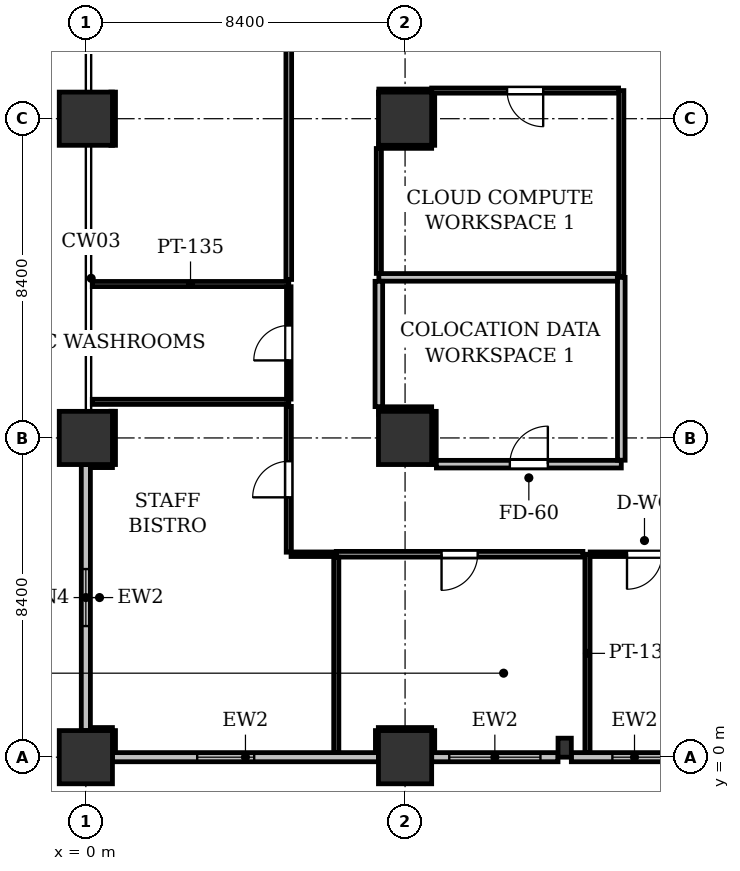
"""IFC4 building model, lengths in metres.
Left out: names, types, materials, properties, quantities, classifications, styles, units other than length and angle.
Written with IfcOpenShell. Run it as: python <this file> out.ifc"""

import sys

from ifc_helpers import new_model, si_unit, direction, frame, frame_2d, origin, origin_2d, place, context, subcontext, project, spatial, rectangle, extrude, element, fill, save


model = new_model("IFC4")
c1 = context("Model", 3, precision=1e-05, world=origin(), true_north=direction((0.0, 1.0)))
c2 = subcontext(c1, "Body", "Model", "MODEL_VIEW")
j1 = project(units=[si_unit("LENGTHUNIT", "METRE"), si_unit("PLANEANGLEUNIT", "RADIAN")], contexts=[c1])
p1 = place(None, origin())
s1 = spatial("IfcSite", under=j1, at=p1, CompositionType="ELEMENT")
p2 = place(p1, origin())
s2 = spatial("IfcBuilding", under=s1, at=p2, CompositionType="ELEMENT")
p3 = place(p2, frame((0.0, 0.0, 15.0)))
s3 = spatial("IfcBuildingStorey", under=s2, at=p3, CompositionType="ELEMENT", Elevation=15.0)
for number, where, z_axis, x_axis in (
    (1, (0.0, 0.0, 0.0), (0.0, 0.0, 1.0), (1.0, 0.0, 0.0)),
    (2, (0.0, 8.4, 0.0), (0.0, 0.0, 1.0), (1.0, 0.0, 0.0)),
    (3, (0.0, 16.8, 0.0), (0.0, 0.0, 1.0), (1.0, 0.0, 0.0)),
    (4, (8.4, 0.0, 0.0), (0.0, 0.0, 1.0), (1.0, 0.0, 0.0)),
    (5, (8.4, 8.4, 0.0), (0.0, 0.0, 1.0), (1.0, 0.0, 0.0)),
    (6, (8.4, 16.8, 0.0), (0.0, 0.0, 1.0), (1.0, 0.0, 0.0)),
):
    element("IfcColumn", number, at=place(p3, frame(where, z_axis=z_axis, x_axis=x_axis)), inside=s3, PredefinedType="COLUMN", context=c2, shape_type="SweptSolid", body=[
        extrude(rectangle(XDim=1.4, YDim=1.4, at=origin_2d()), origin(), (0.0, 0.0, 1.0), 4.8),
    ])
p4 = place(p3, frame((12.6, 0.25, 0.0), z_axis=(0.0, 0.0, 1.0), x_axis=(1.0, 0.0, 0.0)))
e7 = element("IfcColumn", 7, at=p4, inside=s3, PredefinedType="PILASTER", context=c2, shape_type="SweptSolid", body=[
    extrude(rectangle(XDim=0.35, YDim=0.5, at=origin_2d()), origin(), (0.0, 0.0, 1.0), 4.8),
])
p5 = place(p3, frame((0.0, 0.7, 0.0), z_axis=(0.0, 0.0, 1.0), x_axis=(0.0, 1.0, 0.0)))
e8 = element("IfcWall", 8, at=p5, inside=s3, PredefinedType="STANDARD", context=c2, shape_type="SweptSolid", body=[
    extrude(rectangle(XDim=7.0, YDim=0.24, at=frame_2d((3.5, 0.0))), origin(), (0.0, 0.0, 1.0), 3.25),
])
p6 = place(p5, frame((2.75, 0.0, 0.9)))
e9 = element("IfcOpeningElement", 9, at=p6, cuts=e8, PredefinedType="OPENING", context=c2, shape_type="SweptSolid", body=[
    extrude(rectangle(XDim=1.5, YDim=1.6, at=frame_2d((0.75, 0.8))), frame((0.0, 0.13, 0.0), z_axis=(0.0, -1.0, 0.0), x_axis=(1.0, 0.0, 0.0)), (0.0, 0.0, 1.0), 0.26),
])
p7 = place(p3, frame((16.1, 0.0, 0.0), z_axis=(0.0, 0.0, 1.0), x_axis=(-1.0, 0.0, 0.0)))
e10 = element("IfcWall", 10, at=p7, inside=s3, PredefinedType="STANDARD", context=c2, shape_type="SweptSolid", body=[
    extrude(rectangle(XDim=3.325, YDim=0.24, at=frame_2d((1.663, 0.0))), origin(), (0.0, 0.0, 1.0), 3.05),
])
p8 = place(p7, frame((0.745, 0.0, 0.9)))
e11 = element("IfcOpeningElement", 11, at=p8, cuts=e10, PredefinedType="OPENING", context=c2, shape_type="SweptSolid", body=[
    extrude(rectangle(XDim=1.5, YDim=1.6, at=frame_2d((0.75, 0.8))), frame((0.0, 0.13, 0.0), z_axis=(0.0, -1.0, 0.0), x_axis=(1.0, 0.0, 0.0)), (0.0, 0.0, 1.0), 0.26),
])
p9 = place(p3, frame((12.425, 0.0, 0.0), z_axis=(0.0, 0.0, 1.0), x_axis=(-1.0, 0.0, 0.0)))
e12 = element("IfcWall", 12, at=p9, inside=s3, PredefinedType="STANDARD", context=c2, shape_type="SweptSolid", body=[
    extrude(rectangle(XDim=3.325, YDim=0.24, at=frame_2d((1.663, 0.0))), origin(), (0.0, 0.0, 1.0), 3.05),
])
p10 = place(p9, frame((0.462, 0.0, 0.9)))
e13 = element("IfcOpeningElement", 13, at=p10, cuts=e12, PredefinedType="OPENING", context=c2, shape_type="SweptSolid", body=[
    extrude(rectangle(XDim=2.4, YDim=1.8, at=frame_2d((1.2, 0.9))), frame((0.0, 0.13, 0.0), z_axis=(0.0, -1.0, 0.0), x_axis=(1.0, 0.0, 0.0)), (0.0, 0.0, 1.0), 0.26),
])
p11 = place(p3, frame((7.7, 0.0, 0.0), z_axis=(0.0, 0.0, 1.0), x_axis=(-1.0, 0.0, 0.0)))
e14 = element("IfcWall", 14, at=p11, inside=s3, PredefinedType="STANDARD", context=c2, shape_type="SweptSolid", body=[
    extrude(rectangle(XDim=7.0, YDim=0.24, at=frame_2d((3.5, 0.0))), origin(), (0.0, 0.0, 1.0), 3.05),
])
p12 = place(p11, frame((3.27, 0.0, 0.9)))
e15 = element("IfcOpeningElement", 15, at=p12, cuts=e14, PredefinedType="OPENING", context=c2, shape_type="SweptSolid", body=[
    extrude(rectangle(XDim=1.5, YDim=1.6, at=frame_2d((0.75, 0.8))), frame((0.0, 0.13, 0.0), z_axis=(0.0, -1.0, 0.0), x_axis=(1.0, 0.0, 0.0)), (0.0, 0.0, 1.0), 0.26),
])
p13 = place(p3, frame((13.2, 5.34, 0.0), z_axis=(0.0, 0.0, 1.0), x_axis=(0.0, -1.0, 0.0)))
e16 = element("IfcWall", 16, at=p13, inside=s3, PredefinedType="PARTITIONING", context=c2, shape_type="SweptSolid", body=[
    extrude(rectangle(XDim=5.216, YDim=0.135, at=frame_2d((2.608, 0.0))), origin(), (0.0, 0.0, 1.0), 3.05),
])
p14 = place(p3, frame((16.128, 5.34, 0.0), z_axis=(0.0, 0.0, 1.0), x_axis=(-1.0, 0.0, 0.0)))
e17 = element("IfcWall", 17, at=p14, inside=s3, PredefinedType="PARTITIONING", context=c2, shape_type="SweptSolid", body=[
    extrude(rectangle(XDim=2.857, YDim=0.12, at=frame_2d((1.428, 0.0))), origin(), (0.0, 0.0, 1.0), 4.45),
])
p15 = place(p14, frame((0.969, 0.0, 0.0)))
e18 = element("IfcOpeningElement", 18, at=p15, cuts=e17, PredefinedType="OPENING", context=c2, shape_type="SweptSolid", body=[
    extrude(rectangle(XDim=0.92, YDim=2.1, at=frame_2d((0.46, 1.05))), frame((0.0, 0.07, 0.0), z_axis=(0.0, -1.0, 0.0), x_axis=(1.0, 0.0, 0.0)), (0.0, 0.0, 1.0), 0.14),
])
for number, where, z_axis, x_axis in (
    (19, (5.34, 12.45, 0.0), (0.0, 0.0, 1.0), (-1.0, 0.0, 0.0)),
    (20, (0.169, 9.35, 0.0), (0.0, 0.0, 1.0), (1.0, 0.0, 0.0)),
):
    element("IfcWall", number, at=place(p3, frame(where, z_axis=z_axis, x_axis=x_axis)), inside=s3, PredefinedType="PARTITIONING", context=c2, shape_type="SweptSolid", body=[
        extrude(rectangle(XDim=5.171, YDim=0.135, at=frame_2d((2.585, 0.0))), origin(), (0.0, 0.0, 1.0), 3.25),
    ])
p16 = place(p3, frame((5.34, 9.421, 0.0), z_axis=(0.0, 0.0, 1.0), x_axis=(0.0, 1.0, 0.0)))
e21 = element("IfcWall", 21, at=p16, inside=s3, PredefinedType="PARTITIONING", context=c2, shape_type="SweptSolid", body=[
    extrude(rectangle(XDim=2.957, YDim=0.12, at=frame_2d((1.479, 0.0))), origin(), (0.0, 0.0, 1.0), 4.45),
])
p17 = place(p16, frame((1.019, 0.0, 0.0)))
e22 = element("IfcOpeningElement", 22, at=p17, cuts=e21, PredefinedType="OPENING", context=c2, shape_type="SweptSolid", body=[
    extrude(rectangle(XDim=0.92, YDim=2.1, at=frame_2d((0.46, 1.05))), frame((0.0, 0.07, 0.0), z_axis=(0.0, -1.0, 0.0), x_axis=(1.0, 0.0, 0.0)), (0.0, 0.0, 1.0), 0.14),
])
p18 = place(p3, frame((7.71, 9.12, 0.0), z_axis=(0.0, 0.0, 1.0), x_axis=(1.0, 0.0, 0.0)))
e23 = element("IfcWall", 23, at=p18, inside=s3, PredefinedType="PARTITIONING", context=c2, shape_type="SweptSolid", body=[
    extrude(rectangle(XDim=1.39, YDim=0.2, at=frame_2d((0.695, 0.0))), origin(), (0.0, 0.0, 1.0), 3.25),
])
p19 = place(p3, frame((9.12, 9.1, 0.0), z_axis=(0.0, 0.0, 1.0), x_axis=(0.0, -1.0, 0.0)))
e24 = element("IfcWall", 24, at=p19, inside=s3, PredefinedType="PARTITIONING", context=c2, shape_type="SweptSolid", body=[
    extrude(rectangle(XDim=1.39, YDim=0.2, at=frame_2d((0.695, 0.0))), origin(), (0.0, 0.0, 1.0), 3.05),
])
p20 = place(p3, frame((9.224, 7.71, 0.0), z_axis=(0.0, 0.0, 1.0), x_axis=(1.0, 0.0, 0.0)))
e25 = element("IfcWall", 25, at=p20, inside=s3, PredefinedType="PARTITIONING", context=c2, shape_type="SweptSolid", body=[
    extrude(rectangle(XDim=4.866, YDim=0.2, at=frame_2d((2.433, 0.0))), origin(), (0.0, 0.0, 1.0), 4.044),
])
p21 = place(p20, frame((1.933, 0.0, 0.0)))
e26 = element("IfcOpeningElement", 26, at=p21, cuts=e25, PredefinedType="OPENING", context=c2, shape_type="SweptSolid", body=[
    extrude(rectangle(XDim=1.0, YDim=2.15, at=frame_2d((0.5, 1.075))), frame((0.0, 0.11, 0.0), z_axis=(0.0, -1.0, 0.0), x_axis=(1.0, 0.0, 0.0)), (0.0, 0.0, 1.0), 0.22),
])
p22 = place(p3, frame((14.09, 7.814, 0.0), z_axis=(0.0, 0.0, 1.0), x_axis=(0.0, 1.0, 0.0)))
e27 = element("IfcWall", 27, at=p22, inside=s3, PredefinedType="PARTITIONING", context=c2, shape_type="SweptSolid", body=[
    extrude(rectangle(XDim=4.811, YDim=0.2, at=frame_2d((2.406, 0.0))), origin(), (0.0, 0.0, 1.0), 3.05),
])
p23 = place(p3, frame((13.986, 12.625, 0.0), z_axis=(0.0, 0.0, 1.0), x_axis=(-1.0, 0.0, 0.0)))
e28 = element("IfcWall", 28, at=p23, inside=s3, PredefinedType="PARTITIONING", context=c2, shape_type="SweptSolid", body=[
    extrude(rectangle(XDim=6.276, YDim=0.2, at=frame_2d((3.138, 0.0))), origin(), (0.0, 0.0, 1.0), 3.25),
])
p24 = place(p3, frame((7.71, 12.521, 0.0), z_axis=(0.0, 0.0, 1.0), x_axis=(0.0, -1.0, 0.0)))
e29 = element("IfcWall", 29, at=p24, inside=s3, PredefinedType="PARTITIONING", context=c2, shape_type="SweptSolid", body=[
    extrude(rectangle(XDim=3.297, YDim=0.2, at=frame_2d((1.648, 0.0))), origin(), (0.0, 0.0, 1.0), 4.45),
])
p25 = place(p3, frame((7.71, 17.52, 0.0), z_axis=(0.0, 0.0, 1.0), x_axis=(1.0, 0.0, 0.0)))
e30 = element("IfcWall", 30, at=p25, inside=s3, PredefinedType="PARTITIONING", context=c2, shape_type="SweptSolid", body=[
    extrude(rectangle(XDim=1.39, YDim=0.12, at=frame_2d((0.695, 0.0))), origin(), (0.0, 0.0, 1.0), 3.25),
])
p26 = place(p3, frame((9.12, 17.5, 0.0), z_axis=(0.0, 0.0, 1.0), x_axis=(0.0, -1.0, 0.0)))
e31 = element("IfcWall", 31, at=p26, inside=s3, PredefinedType="PARTITIONING", context=c2, shape_type="SweptSolid", body=[
    extrude(rectangle(XDim=1.4, YDim=0.12, at=frame_2d((0.7, 0.0))), origin(), (0.0, 0.0, 1.0), 3.05),
])
p27 = place(p3, frame((9.1, 16.08, 0.0), z_axis=(0.0, 0.0, 1.0), x_axis=(-1.0, 0.0, 0.0)))
e32 = element("IfcWall", 32, at=p27, inside=s3, PredefinedType="PARTITIONING", context=c2, shape_type="SweptSolid", body=[
    extrude(rectangle(XDim=1.39, YDim=0.12, at=frame_2d((0.695, 0.0))), origin(), (0.0, 0.0, 1.0), 3.25),
])
p28 = place(p3, frame((7.71, 16.016, 0.0), z_axis=(0.0, 0.0, 1.0), x_axis=(0.0, -1.0, 0.0)))
e33 = element("IfcWall", 33, at=p28, inside=s3, PredefinedType="PARTITIONING", context=c2, shape_type="SweptSolid", body=[
    extrude(rectangle(XDim=3.287, YDim=0.135, at=frame_2d((1.644, 0.0))), origin(), (0.0, 0.0, 1.0), 4.45),
])
p29 = place(p3, frame((14.09, 12.645, 0.0), z_axis=(0.0, 0.0, 1.0), x_axis=(0.0, 1.0, 0.0)))
e34 = element("IfcWall", 34, at=p29, inside=s3, PredefinedType="PARTITIONING", context=c2, shape_type="SweptSolid", body=[
    extrude(rectangle(XDim=4.895, YDim=0.135, at=frame_2d((2.448, 0.0))), origin(), (0.0, 0.0, 1.0), 3.05),
])
p30 = place(p3, frame((14.019, 17.54, 0.0), z_axis=(0.0, 0.0, 1.0), x_axis=(-1.0, 0.0, 0.0)))
e35 = element("IfcWall", 35, at=p30, inside=s3, PredefinedType="PARTITIONING", context=c2, shape_type="SweptSolid", body=[
    extrude(rectangle(XDim=4.918, YDim=0.135, at=frame_2d((2.459, 0.0))), origin(), (0.0, 0.0, 1.0), 4.45),
])
p31 = place(p30, frame((1.984, 0.0, 0.0)))
e36 = element("IfcOpeningElement", 36, at=p31, cuts=e35, PredefinedType="OPENING", context=c2, shape_type="SweptSolid", body=[
    extrude(rectangle(XDim=0.95, YDim=2.15, at=frame_2d((0.475, 1.075))), frame((0.0, 0.077, 0.0), z_axis=(0.0, -1.0, 0.0), x_axis=(1.0, 0.0, 0.0)), (0.0, 0.0, 1.0), 0.155),
])
p32 = place(p3, frame((13.08, 5.34, 0.0), z_axis=(0.0, 0.0, 1.0), x_axis=(-1.0, 0.0, 0.0)))
e37 = element("IfcWall", 37, at=p32, inside=s3, PredefinedType="PARTITIONING", context=c2, shape_type="SweptSolid", body=[
    extrude(rectangle(XDim=6.49, YDim=0.15, at=frame_2d((3.245, 0.0))), origin(), (0.0, 0.0, 1.0), 3.25),
])
p33 = place(p32, frame((2.77, 0.0, 0.0)))
e38 = element("IfcOpeningElement", 38, at=p33, cuts=e37, PredefinedType="OPENING", context=c2, shape_type="SweptSolid", body=[
    extrude(rectangle(XDim=0.95, YDim=2.15, at=frame_2d((0.475, 1.075))), frame((0.0, 0.085, 0.0), z_axis=(0.0, -1.0, 0.0), x_axis=(1.0, 0.0, 0.0)), (0.0, 0.0, 1.0), 0.17),
])
p34 = place(p3, frame((6.59, 5.261, 0.0), z_axis=(0.0, 0.0, 1.0), x_axis=(0.0, -1.0, 0.0)))
e39 = element("IfcWall", 39, at=p34, inside=s3, PredefinedType="PARTITIONING", context=c2, shape_type="SweptSolid", body=[
    extrude(rectangle(XDim=5.137, YDim=0.135, at=frame_2d((2.568, 0.0))), origin(), (0.0, 0.0, 1.0), 3.05),
])
p35 = place(p3, frame((7.68, 0.124, 0.0), z_axis=(0.0, 0.0, 1.0), x_axis=(0.0, 1.0, 0.0)))
e40 = element("IfcWall", 40, at=p35, inside=s3, PredefinedType="PARTITIONING", context=c2, shape_type="SweptSolid", body=[
    extrude(rectangle(XDim=0.576, YDim=0.12, at=frame_2d((0.288, 0.0))), origin(), (0.0, 0.0, 1.0), 3.05),
])
p36 = place(p3, frame((7.696, 0.719, 0.0), z_axis=(0.0, 0.0, 1.0), x_axis=(0.99999993953, 0.000347765585, 0.0)))
e41 = element("IfcWall", 41, at=p36, inside=s3, PredefinedType="PARTITIONING", context=c2, shape_type="SweptSolid", body=[
    extrude(rectangle(XDim=1.404, YDim=0.12, at=frame_2d((0.702, 0.0))), origin(), (0.0, 0.0, 1.0), 3.25),
])
p37 = place(p3, frame((9.12, 0.7, 0.0), z_axis=(0.0, 0.0, 1.0), x_axis=(0.0, -1.0, 0.0)))
e42 = element("IfcWall", 42, at=p37, inside=s3, PredefinedType="PARTITIONING", context=c2, shape_type="SweptSolid", body=[
    extrude(rectangle(XDim=0.576, YDim=0.12, at=frame_2d((0.288, 0.0))), origin(), (0.0, 0.0, 1.0), 3.05),
])
p38 = place(p3, frame((5.34, 5.394, 0.0), z_axis=(0.0, 0.0, 1.0), x_axis=(-6.3645621e-05, 0.999999997975, 0.0)))
e43 = element("IfcWall", 43, at=p38, inside=s3, PredefinedType="PARTITIONING", context=c2, shape_type="SweptSolid", body=[
    extrude(rectangle(XDim=3.836, YDim=0.135, at=frame_2d((1.918, 0.0))), origin(), (0.0, 0.0, 1.0), 3.05),
])
p39 = place(p38, frame((1.443, 0.0, 0.0)))
e44 = element("IfcOpeningElement", 44, at=p39, cuts=e43, PredefinedType="OPENING", context=c2, shape_type="SweptSolid", body=[
    extrude(rectangle(XDim=0.95, YDim=2.15, at=frame_2d((0.475, 1.075))), frame((0.0, 0.077, 0.0), z_axis=(0.0, -1.0, 0.0), x_axis=(1.0, 0.0, 0.0)), (0.0, 0.0, 1.0), 0.155),
])
p40 = place(p3, frame((0.72, 9.102, 0.0), z_axis=(0.0, 0.0, 1.0), x_axis=(0.0, -1.0, 0.0)))
e45 = element("IfcWall", 45, at=p40, inside=s3, PredefinedType="PARTITIONING", context=c2, shape_type="SweptSolid", body=[
    extrude(rectangle(XDim=1.402, YDim=0.12, at=frame_2d((0.701, 0.0))), origin(), (0.0, 0.0, 1.0), 3.05),
])
for number, where, z_axis, x_axis in (
    (46, (0.7, 7.68, 0.0), (0.0, 0.0, 1.0), (-1.0, 0.0, 0.0)),
    (47, (0.124, 0.72, 0.0), (0.0, 0.0, 1.0), (1.0, 0.0, 0.0)),
):
    element("IfcWall", number, at=place(p3, frame(where, z_axis=z_axis, x_axis=x_axis)), inside=s3, PredefinedType="PARTITIONING", context=c2, shape_type="SweptSolid", body=[
        extrude(rectangle(XDim=0.576, YDim=0.12, at=frame_2d((0.288, 0.0))), origin(), (0.0, 0.0, 1.0), 3.25),
    ])
p41 = place(p3, frame((0.72, 0.7, 0.0), z_axis=(0.0, 0.0, 1.0), x_axis=(0.0, -1.0, 0.0)))
e48 = element("IfcWall", 48, at=p41, inside=s3, PredefinedType="PARTITIONING", context=c2, shape_type="SweptSolid", body=[
    extrude(rectangle(XDim=0.576, YDim=0.12, at=frame_2d((0.288, 0.0))), origin(), (0.0, 0.0, 1.0), 3.05),
])
p42 = place(p3, frame((6.57, 5.34, 0.0), z_axis=(0.0, 0.0, 1.0), x_axis=(-1.0, 0.0, 0.0)))
e49 = element("IfcWall", 49, at=p42, inside=s3, PredefinedType="PARTITIONING", context=c2, shape_type="SweptSolid", body=[
    extrude(rectangle(XDim=1.17, YDim=0.12, at=frame_2d((0.585, 0.0))), origin(), (0.0, 0.0, 1.0), 4.45),
])
p43 = place(p3, frame((0.72, 17.5, 0.0), z_axis=(0.0, 0.0, 1.0), x_axis=(0.0, -1.0, 0.0)))
e50 = element("IfcWall", 50, at=p43, inside=s3, PredefinedType="PARTITIONING", context=c2, shape_type="SweptSolid", body=[
    extrude(rectangle(XDim=1.4, YDim=0.12, at=frame_2d((0.7, 0.0))), origin(), (0.0, 0.0, 1.0), 3.05),
])
p44 = place(p3, frame((5.34, 12.57, 0.0), z_axis=(0.0, 0.0, 1.0), x_axis=(1.0073537e-05, 0.999999999949, 0.0)))
e51 = element("IfcWall", 51, at=p44, inside=s3, PredefinedType="PARTITIONING", context=c2, shape_type="SweptSolid", body=[
    extrude(rectangle(XDim=24.236, YDim=0.15, at=frame_2d((12.118, 0.0))), origin(), (0.0, 0.0, 1.0), 3.05),
])
p45 = place(p44, frame((11.643, 0.0, 0.0)))
e52 = element("IfcOpeningElement", 52, at=p45, cuts=e51, PredefinedType="OPENING", context=c2, shape_type="SweptSolid", body=[
    extrude(rectangle(XDim=0.95, YDim=2.15, at=frame_2d((0.475, 1.075))), frame((0.0, 0.085, 0.0), z_axis=(0.0, -1.0, 0.0), x_axis=(1.0, 0.0, 0.0)), (0.0, 0.0, 1.0), 0.17),
])
p46 = place(p6, origin())
e53 = element("IfcWindow", 53, at=p46, inside=s3, PartitioningType="SINGLE_PANEL", PredefinedType="WINDOW", context=c2, shape_type="SweptSolid", body=[
    extrude(rectangle(XDim=1.5, YDim=1.6, at=frame_2d((0.75, 0.8))), frame((0.0, 0.03, 0.0), z_axis=(0.0, -1.0, 0.0), x_axis=(1.0, 0.0, 0.0)), (0.0, 0.0, 1.0), 0.06),
])
fill(e9, e53)
p47 = place(p8, origin())
e54 = element("IfcWindow", 54, at=p47, inside=s3, PartitioningType="SINGLE_PANEL", PredefinedType="WINDOW", context=c2, shape_type="SweptSolid", body=[
    extrude(rectangle(XDim=1.5, YDim=1.6, at=frame_2d((0.75, 0.8))), frame((0.0, 0.03, 0.0), z_axis=(0.0, -1.0, 0.0), x_axis=(1.0, 0.0, 0.0)), (0.0, 0.0, 1.0), 0.06),
])
fill(e11, e54)
p48 = place(p10, origin())
e55 = element("IfcWindow", 55, at=p48, inside=s3, PartitioningType="SINGLE_PANEL", PredefinedType="WINDOW", context=c2, shape_type="SweptSolid", body=[
    extrude(rectangle(XDim=2.4, YDim=1.8, at=frame_2d((1.2, 0.9))), frame((0.0, 0.03, 0.0), z_axis=(0.0, -1.0, 0.0), x_axis=(1.0, 0.0, 0.0)), (0.0, 0.0, 1.0), 0.06),
])
fill(e13, e55)
p49 = place(p12, origin())
e56 = element("IfcWindow", 56, at=p49, inside=s3, PartitioningType="SINGLE_PANEL", PredefinedType="WINDOW", context=c2, shape_type="SweptSolid", body=[
    extrude(rectangle(XDim=1.5, YDim=1.6, at=frame_2d((0.75, 0.8))), frame((0.0, 0.03, 0.0), z_axis=(0.0, -1.0, 0.0), x_axis=(1.0, 0.0, 0.0)), (0.0, 0.0, 1.0), 0.06),
])
fill(e15, e56)
p50 = place(p15, origin())
e57 = element("IfcDoor", 57, at=p50, inside=s3, OperationType="SINGLE_SWING_RIGHT", PredefinedType="DOOR", context=c2, shape_type="SweptSolid", body=[
    extrude(rectangle(XDim=0.92, YDim=2.1, at=frame_2d((0.46, 1.05))), frame((0.0, 0.025, 0.0), z_axis=(0.0, -1.0, 0.0), x_axis=(1.0, 0.0, 0.0)), (0.0, 0.0, 1.0), 0.05),
])
fill(e18, e57)
p51 = place(p17, origin())
e58 = element("IfcDoor", 58, at=p51, inside=s3, OperationType="SINGLE_SWING_LEFT", PredefinedType="DOOR", context=c2, shape_type="SweptSolid", body=[
    extrude(rectangle(XDim=0.92, YDim=2.1, at=frame_2d((0.46, 1.05))), frame((0.0, 0.025, 0.0), z_axis=(0.0, -1.0, 0.0), x_axis=(1.0, 0.0, 0.0)), (0.0, 0.0, 1.0), 0.05),
])
fill(e22, e58)
p52 = place(p21, origin())
e59 = element("IfcDoor", 59, at=p52, inside=s3, OperationType="SINGLE_SWING_RIGHT", PredefinedType="DOOR", context=c2, shape_type="SweptSolid", body=[
    extrude(rectangle(XDim=1.0, YDim=2.15, at=frame_2d((0.5, 1.075))), frame((0.0, 0.025, 0.0), z_axis=(0.0, -1.0, 0.0), x_axis=(1.0, 0.0, 0.0)), (0.0, 0.0, 1.0), 0.05),
])
fill(e26, e59)
p53 = place(p31, origin())
e60 = element("IfcDoor", 60, at=p53, inside=s3, OperationType="SINGLE_SWING_LEFT", PredefinedType="DOOR", context=c2, shape_type="SweptSolid", body=[
    extrude(rectangle(XDim=0.95, YDim=2.15, at=frame_2d((0.475, 1.075))), frame((0.0, 0.025, 0.0), z_axis=(0.0, -1.0, 0.0), x_axis=(1.0, 0.0, 0.0)), (0.0, 0.0, 1.0), 0.05),
])
fill(e36, e60)
p54 = place(p33, origin())
e61 = element("IfcDoor", 61, at=p54, inside=s3, OperationType="SINGLE_SWING_RIGHT", PredefinedType="DOOR", context=c2, shape_type="SweptSolid", body=[
    extrude(rectangle(XDim=0.95, YDim=2.15, at=frame_2d((0.475, 1.075))), frame((0.0, 0.025, 0.0), z_axis=(0.0, -1.0, 0.0), x_axis=(1.0, 0.0, 0.0)), (0.0, 0.0, 1.0), 0.05),
])
fill(e38, e61)
p55 = place(p39, origin())
e62 = element("IfcDoor", 62, at=p55, inside=s3, OperationType="SINGLE_SWING_LEFT", PredefinedType="DOOR", context=c2, shape_type="SweptSolid", body=[
    extrude(rectangle(XDim=0.95, YDim=2.15, at=frame_2d((0.475, 1.075))), frame((0.0, 0.025, 0.0), z_axis=(0.0, -1.0, 0.0), x_axis=(1.0, 0.0, 0.0)), (0.0, 0.0, 1.0), 0.05),
])
fill(e44, e62)
save(model, sys.argv[1])
